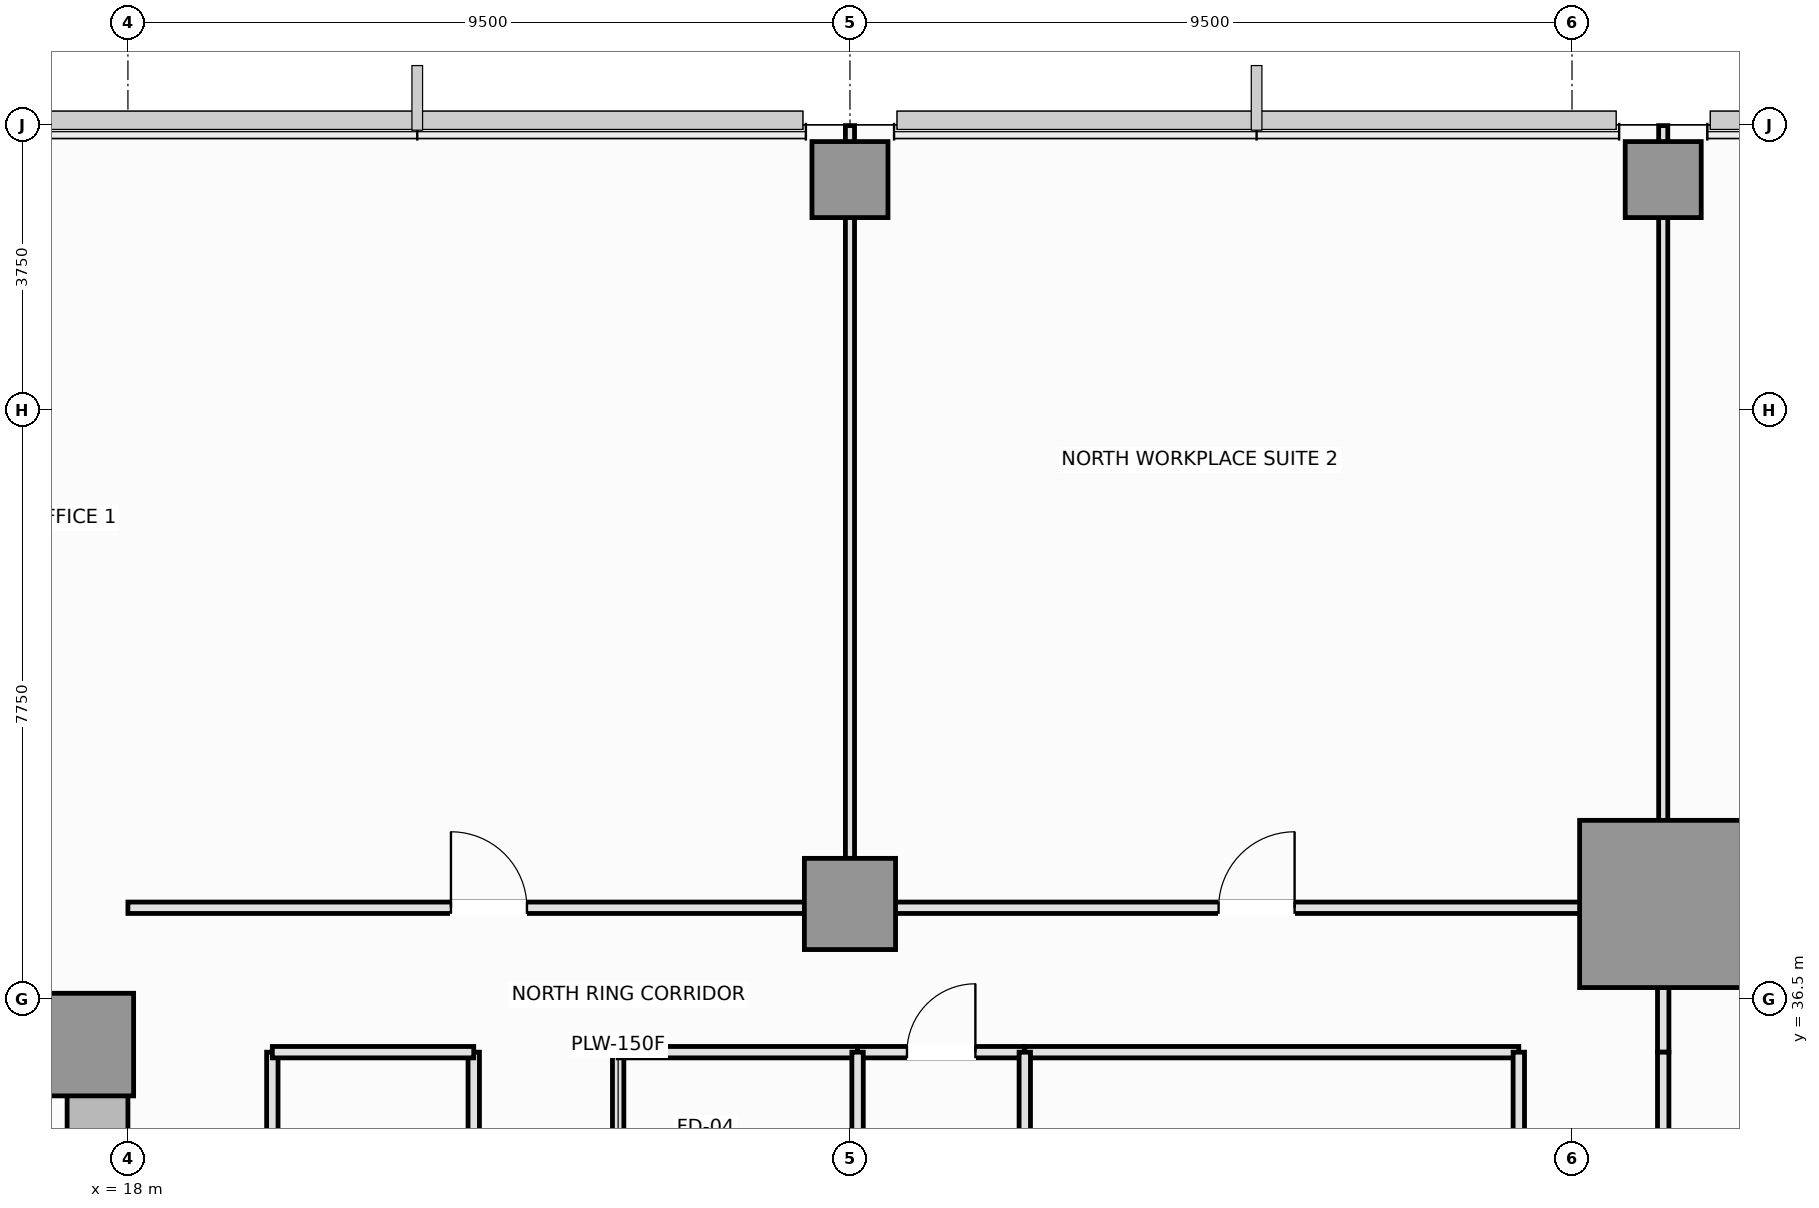
"""IFC4 building model, lengths in metres.
Left out: names, types, materials, properties, quantities, classifications, styles, units other than length and angle.
Written with IfcOpenShell. Run it as: python <this file> out.ifc"""

import sys

from ifc_helpers import new_model, si_unit, direction, frame, frame_2d, origin, origin_2d, place, context, subcontext, project, spatial, rectangle, extrude, element, fill, save


model = new_model("IFC4")
c1 = context("Model", 3, precision=1e-05, world=origin(), true_north=direction((0.0, 1.0)))
c2 = subcontext(c1, "Body", "Model", "MODEL_VIEW")
j1 = project(units=[si_unit("LENGTHUNIT", "METRE"), si_unit("PLANEANGLEUNIT", "RADIAN")], contexts=[c1])
p1 = place(None, origin())
s1 = spatial("IfcSite", under=j1, at=p1, CompositionType="ELEMENT")
p2 = place(p1, origin())
s2 = spatial("IfcBuilding", under=s1, at=p2, CompositionType="ELEMENT")
p3 = place(p2, frame((0.0, 0.0, 25.6)))
s3 = spatial("IfcBuildingStorey", under=s2, at=p3, CompositionType="ELEMENT", Elevation=25.6)
p4 = place(p3, frame((4.5, 36.1, 0.0), z_axis=(0.0, 0.0, 1.0), x_axis=(1.0, 0.0, 0.0)))
e1 = element("IfcWall", 1, at=p4, inside=s3, PredefinedType="SHEAR", context=c2, shape_type="SweptSolid", body=[
    extrude(rectangle(XDim=13.5, YDim=0.8, at=frame_2d((6.75, 0.0))), origin(), (0.0, 0.0, 1.0), 3.55),
])
p5 = place(p3, frame((17.6, 27.05, 0.0), z_axis=(0.0, 0.0, 1.0), x_axis=(0.0, 1.0, 0.0)))
e2 = element("IfcWall", 2, at=p5, inside=s3, PredefinedType="SHEAR", context=c2, shape_type="SweptSolid", body=[
    extrude(rectangle(XDim=8.65, YDim=0.8, at=frame_2d((4.325, 0.0))), origin(), (0.0, 0.0, 1.0), 3.55),
])
p6 = place(p5, frame((3.45, 0.0, 0.0)))
e3 = element("IfcOpeningElement", 3, at=p6, cuts=e2, PredefinedType="OPENING", context=c2, shape_type="SweptSolid", body=[
    extrude(rectangle(XDim=1.1, YDim=2.15, at=frame_2d((0.55, 1.075))), frame((0.0, 0.41, 0.0), z_axis=(0.0, -1.0, 0.0), x_axis=(1.0, 0.0, 0.0)), (0.0, 0.0, 1.0), 0.82),
])
p7 = place(p3, frame((17.4, 35.9, 0.0), z_axis=(0.0, 0.0, 1.0), x_axis=(1.0, 0.0, 0.0)))
e4 = element("IfcColumn", 4, at=p7, inside=s3, PredefinedType="PILASTER", context=c2, shape_type="SweptSolid", body=[
    extrude(rectangle(XDim=1.35, YDim=1.35, at=origin_2d()), origin(), (0.0, 0.0, 1.0), 3.55),
])
p8 = place(p3, frame((38.2, 37.75, 0.0), z_axis=(0.0, 0.0, 1.0), x_axis=(1.0, 0.0, 0.0)))
e5 = element("IfcColumn", 5, at=p8, inside=s3, PredefinedType="COLUMN", context=c2, shape_type="SweptSolid", body=[
    extrude(rectangle(XDim=2.2, YDim=2.2, at=origin_2d()), origin(), (0.0, 0.0, 1.0), 3.55),
])
p9 = place(p3, frame((27.5, 37.75, 0.0), z_axis=(0.0, 0.0, 1.0), x_axis=(1.0, 0.0, 0.0)))
e6 = element("IfcColumn", 6, at=p9, inside=s3, PredefinedType="COLUMN", context=c2, shape_type="SweptSolid", body=[
    extrude(rectangle(XDim=1.2, YDim=1.2, at=origin_2d()), origin(), (0.0, 0.0, 1.0), 3.55),
])
for number, where, z_axis, x_axis in (
    (7, (27.5, 47.28, 0.0), (0.0, 0.0, 1.0), (1.0, 0.0, 0.0)),
    (8, (38.2, 47.28, 0.0), (0.0, 0.0, 1.0), (1.0, 0.0, 0.0)),
):
    element("IfcColumn", number, at=place(p3, frame(where, z_axis=z_axis, x_axis=x_axis)), inside=s3, PredefinedType="COLUMN", context=c2, shape_type="SweptSolid", body=[
        extrude(rectangle(XDim=1.0, YDim=1.0, at=origin_2d()), origin(), (0.0, 0.0, 1.0), 3.55),
    ])
p10 = place(p3, frame((22.55, 32.77, 0.0), z_axis=(0.0, 0.0, 1.0), x_axis=(0.0, 1.0, 0.0)))
e9 = element("IfcWall", 9, at=p10, inside=s3, PredefinedType="PARTITIONING", context=c2, shape_type="SweptSolid", body=[
    extrude(rectangle(XDim=3.03, YDim=0.15, at=frame_2d((1.515, 0.0))), origin(), (0.0, 0.0, 1.0), 3.01),
])
p11 = place(p10, frame((1.015, 0.0, 0.0)))
e10 = element("IfcOpeningElement", 10, at=p11, cuts=e9, PredefinedType="OPENING", context=c2, shape_type="SweptSolid", body=[
    extrude(rectangle(XDim=1.0, YDim=2.15, at=frame_2d((0.5, 1.075))), frame((0.0, 0.085, 0.0), z_axis=(0.0, -1.0, 0.0), x_axis=(1.0, 0.0, 0.0)), (0.0, 0.0, 1.0), 0.17),
])
p12 = place(p3, frame((24.45, 32.7, 0.0), z_axis=(0.0, 0.0, 1.0), x_axis=(0.0, 1.0, 0.0)))
e11 = element("IfcWall", 11, at=p12, inside=s3, PredefinedType="PLUMBINGWALL", context=c2, shape_type="SweptSolid", body=[
    extrude(rectangle(XDim=3.1, YDim=0.15, at=frame_2d((1.55, 0.0))), origin(), (0.0, 0.0, 1.0), 3.37),
])
p13 = place(p12, frame((1.1, 0.0, 0.0)))
e12 = element("IfcOpeningElement", 12, at=p13, cuts=e11, PredefinedType="OPENING", context=c2, shape_type="SweptSolid", body=[
    extrude(rectangle(XDim=0.9, YDim=2.1, at=frame_2d((0.45, 1.05))), frame((0.0, 0.085, 0.0), z_axis=(0.0, -1.0, 0.0), x_axis=(1.0, 0.0, 0.0)), (0.0, 0.0, 1.0), 0.17),
])
p14 = place(p3, frame((19.9, 32.77, 0.0), z_axis=(0.0, 0.0, 1.0), x_axis=(0.0, 1.0, 0.0)))
e13 = element("IfcWall", 13, at=p14, inside=s3, PredefinedType="PARTITIONING", context=c2, shape_type="SweptSolid", body=[
    extrude(rectangle(XDim=3.03, YDim=0.15, at=frame_2d((1.515, 0.0))), origin(), (0.0, 0.0, 1.0), 3.37),
])
p15 = place(p3, frame((19.9, 35.8, 0.0), z_axis=(0.0, 0.0, 1.0), x_axis=(1.0, 0.0, 0.0)))
e14 = element("IfcWall", 14, at=p15, inside=s3, PredefinedType="PARTITIONING", context=c2, shape_type="SweptSolid", body=[
    extrude(rectangle(XDim=2.65, YDim=0.15, at=frame_2d((1.325, 0.0))), origin(), (0.0, 0.0, 1.0), 3.37),
])
p16 = place(p3, frame((24.45, 35.8, 0.0), z_axis=(0.0, 0.0, 1.0), x_axis=(1.0, 0.0, 0.0)))
e15 = element("IfcWall", 15, at=p16, inside=s3, PredefinedType="PLUMBINGWALL", context=c2, shape_type="SweptSolid", body=[
    extrude(rectangle(XDim=3.15, YDim=0.15, at=frame_2d((1.575, 0.0))), origin(), (0.0, 0.0, 1.0), 3.37),
])
p17 = place(p3, frame((27.6, 35.8, 0.0), z_axis=(0.0, 0.0, 1.0), x_axis=(1.0, 0.0, 0.0)))
e16 = element("IfcWall", 16, at=p17, inside=s3, PredefinedType="PLUMBINGWALL", context=c2, shape_type="SweptSolid", body=[
    extrude(rectangle(XDim=2.2, YDim=0.15, at=frame_2d((1.1, 0.0))), origin(), (0.0, 0.0, 1.0), 3.37),
])
p18 = place(p17, frame((0.65, 0.0, 0.0)))
e17 = element("IfcOpeningElement", 17, at=p18, cuts=e16, PredefinedType="OPENING", context=c2, shape_type="SweptSolid", body=[
    extrude(rectangle(XDim=0.9, YDim=2.1, at=frame_2d((0.45, 1.05))), frame((0.0, 0.085, 0.0), z_axis=(0.0, -1.0, 0.0), x_axis=(1.0, 0.0, 0.0)), (0.0, 0.0, 1.0), 0.17),
])
p19 = place(p3, frame((29.8, 35.8, 0.0), z_axis=(0.0, 0.0, 1.0), x_axis=(1.0, 0.0, 0.0)))
e18 = element("IfcWall", 18, at=p19, inside=s3, PredefinedType="PARTITIONING", context=c2, shape_type="SweptSolid", body=[
    extrude(rectangle(XDim=6.5, YDim=0.15, at=frame_2d((3.25, 0.0))), origin(), (0.0, 0.0, 1.0), 3.37),
])
p20 = place(p3, frame((18.0, 37.7, 0.0), z_axis=(0.0, 0.0, 1.0), x_axis=(1.0, 0.0, 0.0)))
e19 = element("IfcWall", 19, at=p20, inside=s3, PredefinedType="PARTITIONING", context=c2, shape_type="SweptSolid", body=[
    extrude(rectangle(XDim=9.5, YDim=0.15, at=frame_2d((4.75, 0.0))), origin(), (0.0, 0.0, 1.0), 2.72),
])
p21 = place(p20, frame((4.25, 0.0, 0.0)))
e20 = element("IfcOpeningElement", 20, at=p21, cuts=e19, PredefinedType="OPENING", context=c2, shape_type="SweptSolid", body=[
    extrude(rectangle(XDim=1.0, YDim=2.15, at=frame_2d((0.5, 1.075))), frame((0.0, 0.085, 0.0), z_axis=(0.0, -1.0, 0.0), x_axis=(1.0, 0.0, 0.0)), (0.0, 0.0, 1.0), 0.17),
])
p22 = place(p3, frame((27.5, 37.7, 0.0), z_axis=(0.0, 0.0, 1.0), x_axis=(1.0, 0.0, 0.0)))
e21 = element("IfcWall", 21, at=p22, inside=s3, PredefinedType="PARTITIONING", context=c2, shape_type="SweptSolid", body=[
    extrude(rectangle(XDim=10.7, YDim=0.15, at=frame_2d((5.35, 0.0))), origin(), (0.0, 0.0, 1.0), 2.72),
])
p23 = place(p22, frame((4.85, 0.0, 0.0)))
e22 = element("IfcOpeningElement", 22, at=p23, cuts=e21, PredefinedType="OPENING", context=c2, shape_type="SweptSolid", body=[
    extrude(rectangle(XDim=1.0, YDim=2.15, at=frame_2d((0.5, 1.075))), frame((0.0, 0.085, 0.0), z_axis=(0.0, -1.0, 0.0), x_axis=(1.0, 0.0, 0.0)), (0.0, 0.0, 1.0), 0.17),
])
p24 = place(p3, frame((38.2, 35.8, 0.0), z_axis=(0.0, 0.0, 1.0), x_axis=(0.0, 1.0, 0.0)))
e23 = element("IfcWall", 23, at=p24, inside=s3, PredefinedType="PARTITIONING", context=c2, shape_type="SweptSolid", body=[
    extrude(rectangle(XDim=1.9, YDim=0.15, at=frame_2d((0.95, 0.0))), origin(), (0.0, 0.0, 1.0), 2.82),
])
p25 = place(p3, frame((36.3, 32.7, 0.0), z_axis=(0.0, 0.0, 1.0), x_axis=(0.0, 1.0, 0.0)))
e24 = element("IfcWall", 24, at=p25, inside=s3, PredefinedType="PARTITIONING", context=c2, shape_type="SweptSolid", body=[
    extrude(rectangle(XDim=3.1, YDim=0.15, at=frame_2d((1.55, 0.0))), origin(), (0.0, 0.0, 1.0), 3.37),
])
p26 = place(p25, frame((1.05, 0.0, 0.0)))
e25 = element("IfcOpeningElement", 25, at=p26, cuts=e24, PredefinedType="OPENING", context=c2, shape_type="SweptSolid", body=[
    extrude(rectangle(XDim=1.0, YDim=2.15, at=frame_2d((0.5, 1.075))), frame((0.0, 0.085, 0.0), z_axis=(0.0, -1.0, 0.0), x_axis=(1.0, 0.0, 0.0)), (0.0, 0.0, 1.0), 0.17),
])
p27 = place(p3, frame((38.2, 32.0, 0.0), z_axis=(0.0, 0.0, 1.0), x_axis=(0.0, 1.0, 0.0)))
e26 = element("IfcWall", 26, at=p27, inside=s3, PredefinedType="PARTITIONING", context=c2, shape_type="SweptSolid", body=[
    extrude(rectangle(XDim=3.8, YDim=0.15, at=frame_2d((1.9, 0.0))), origin(), (0.0, 0.0, 1.0), 2.82),
])
p28 = place(p27, frame((1.4, 0.0, 0.0)))
e27 = element("IfcOpeningElement", 27, at=p28, cuts=e26, PredefinedType="OPENING", context=c2, shape_type="SweptSolid", body=[
    extrude(rectangle(XDim=1.0, YDim=2.15, at=frame_2d((0.5, 1.075))), frame((0.0, 0.085, 0.0), z_axis=(0.0, -1.0, 0.0), x_axis=(1.0, 0.0, 0.0)), (0.0, 0.0, 1.0), 0.17),
])
for number, where, z_axis, x_axis in (
    (28, (27.6, 32.7, 0.0), (0.0, 0.0, 1.0), (0.0, 1.0, 0.0)),
    (29, (29.8, 32.7, 0.0), (0.0, 0.0, 1.0), (0.0, 1.0, 0.0)),
):
    element("IfcWall", number, at=place(p3, frame(where, z_axis=z_axis, x_axis=x_axis)), inside=s3, PredefinedType="PLUMBINGWALL", context=c2, shape_type="SweptSolid", body=[
        extrude(rectangle(XDim=3.1, YDim=0.15, at=frame_2d((1.55, 0.0))), origin(), (0.0, 0.0, 1.0), 3.37),
    ])
for number, where, z_axis, x_axis in (
    (30, (27.5, 37.7, 0.0), (0.0, 0.0, 1.0), (0.0, 1.0, 0.0)),
    (31, (38.2, 37.7, 0.0), (0.0, 0.0, 1.0), (0.0, 1.0, 0.0)),
):
    element("IfcWall", number, at=place(p3, frame(where, z_axis=z_axis, x_axis=x_axis)), inside=s3, PredefinedType="PARTITIONING", context=c2, shape_type="SweptSolid", body=[
        extrude(rectangle(XDim=10.29, YDim=0.12, at=frame_2d((5.145, 0.0))), origin(), (0.0, 0.0, 1.0), 2.82),
    ])
p29 = place(p18, origin())
e32 = element("IfcDoor", 32, at=p29, inside=s3, OperationType="SINGLE_SWING_RIGHT", PredefinedType="DOOR", context=c2, shape_type="SweptSolid", body=[
    extrude(rectangle(XDim=0.9, YDim=2.1, at=frame_2d((0.45, 1.05))), frame((0.0, 0.025, 0.0), z_axis=(0.0, -1.0, 0.0), x_axis=(1.0, 0.0, 0.0)), (0.0, 0.0, 1.0), 0.05),
])
fill(e17, e32)
p30 = place(p21, origin())
e33 = element("IfcDoor", 33, at=p30, inside=s3, OperationType="SINGLE_SWING_LEFT", PredefinedType="DOOR", context=c2, shape_type="SweptSolid", body=[
    extrude(rectangle(XDim=1.0, YDim=2.15, at=frame_2d((0.5, 1.075))), frame((0.0, 0.025, 0.0), z_axis=(0.0, -1.0, 0.0), x_axis=(1.0, 0.0, 0.0)), (0.0, 0.0, 1.0), 0.05),
])
fill(e20, e33)
p31 = place(p23, origin())
e34 = element("IfcDoor", 34, at=p31, inside=s3, OperationType="SINGLE_SWING_RIGHT", PredefinedType="DOOR", context=c2, shape_type="SweptSolid", body=[
    extrude(rectangle(XDim=1.0, YDim=2.15, at=frame_2d((0.5, 1.075))), frame((0.0, 0.025, 0.0), z_axis=(0.0, -1.0, 0.0), x_axis=(1.0, 0.0, 0.0)), (0.0, 0.0, 1.0), 0.05),
])
fill(e22, e34)
save(model, sys.argv[1])
